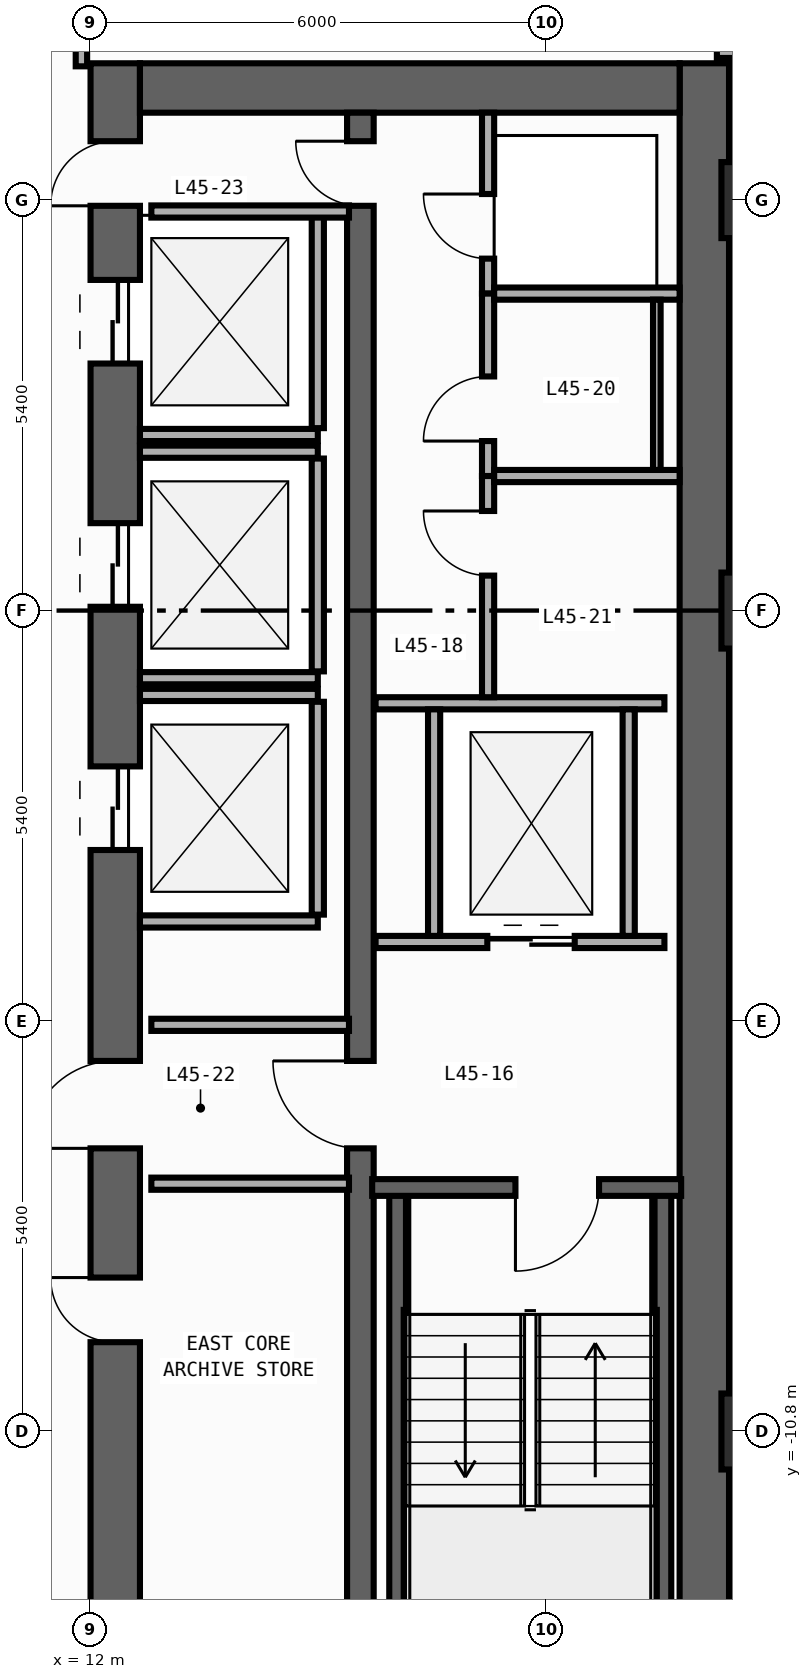
"""IFC4 building model, lengths in metres.
Left out: names, types, materials, properties, quantities, classifications, styles, units other than length and angle.
Written with IfcOpenShell. Run it as: python <this file> out.ifc"""

import sys

from ifc_helpers import new_model, si_unit, direction, frame, frame_2d, origin, origin_2d, place, context, subcontext, project, spatial, rectangle, extrude, element, fill, save


model = new_model("IFC4")
c1 = context("Model", 3, precision=1e-05, world=origin(), true_north=direction((0.0, 1.0)))
c2 = subcontext(c1, "Body", "Model", "MODEL_VIEW")
j1 = project(units=[si_unit("LENGTHUNIT", "METRE"), si_unit("PLANEANGLEUNIT", "RADIAN")], contexts=[c1])
p1 = place(None, origin())
s1 = spatial("IfcSite", under=j1, at=p1, CompositionType="ELEMENT")
p2 = place(p1, origin())
s2 = spatial("IfcBuilding", under=s1, at=p2, CompositionType="ELEMENT")
p3 = place(p2, frame((0.0, 0.0, 195.4)))
s3 = spatial("IfcBuildingStorey", under=s2, at=p3, CompositionType="ELEMENT", Elevation=195.4)
p4 = place(p3, frame((12.325, -19.8, 0.0), z_axis=(0.0, 0.0, 1.0), x_axis=(0.0, 1.0, 0.0)))
e1 = element("IfcWall", 1, at=p4, inside=s3, PredefinedType="SHEAR", context=c2, shape_type="SweptSolid", body=[
    extrude(rectangle(XDim=27.0, YDim=0.65, at=frame_2d((13.5, 0.0))), origin(), (0.0, 0.0, 1.0), 3.54),
])
p5 = place(p4, frame((23.05, 0.0, 0.0)))
e2 = element("IfcOpeningElement", 2, at=p5, cuts=e1, PredefinedType="OPENING", context=c2, shape_type="SweptSolid", body=[
    extrude(rectangle(XDim=1.1, YDim=2.2, at=frame_2d((0.55, 1.1))), frame((0.0, 0.335, 0.0), z_axis=(0.0, -1.0, 0.0), x_axis=(1.0, 0.0, 0.0)), (0.0, 0.0, 1.0), 0.67),
])
p6 = place(p4, frame((19.85, 0.0, 0.0)))
e3 = element("IfcOpeningElement", 3, at=p6, cuts=e1, PredefinedType="OPENING", context=c2, shape_type="SweptSolid", body=[
    extrude(rectangle(XDim=1.1, YDim=2.2, at=frame_2d((0.55, 1.1))), frame((0.0, 0.335, 0.0), z_axis=(0.0, -1.0, 0.0), x_axis=(1.0, 0.0, 0.0)), (0.0, 0.0, 1.0), 0.67),
])
p7 = place(p4, frame((16.65, 0.0, 0.0)))
e4 = element("IfcOpeningElement", 4, at=p7, cuts=e1, PredefinedType="OPENING", context=c2, shape_type="SweptSolid", body=[
    extrude(rectangle(XDim=1.1, YDim=2.2, at=frame_2d((0.55, 1.1))), frame((0.0, 0.335, 0.0), z_axis=(0.0, -1.0, 0.0), x_axis=(1.0, 0.0, 0.0)), (0.0, 0.0, 1.0), 0.67),
])
p8 = place(p4, frame((10.175, 0.0, 0.0)))
e5 = element("IfcOpeningElement", 5, at=p8, cuts=e1, PredefinedType="OPENING", context=c2, shape_type="SweptSolid", body=[
    extrude(rectangle(XDim=0.85, YDim=2.1, at=frame_2d((0.425, 1.05))), frame((0.0, 0.335, 0.0), z_axis=(0.0, -1.0, 0.0), x_axis=(1.0, 0.0, 0.0)), (0.0, 0.0, 1.0), 0.67),
])
p9 = place(p4, frame((12.725, 0.0, 0.0)))
e6 = element("IfcOpeningElement", 6, at=p9, cuts=e1, PredefinedType="OPENING", context=c2, shape_type="SweptSolid", body=[
    extrude(rectangle(XDim=1.15, YDim=2.2, at=frame_2d((0.575, 1.1))), frame((0.0, 0.335, 0.0), z_axis=(0.0, -1.0, 0.0), x_axis=(1.0, 0.0, 0.0)), (0.0, 0.0, 1.0), 0.67),
])
p10 = place(p4, frame((25.125, 0.0, 0.0)))
e7 = element("IfcOpeningElement", 7, at=p10, cuts=e1, PredefinedType="OPENING", context=c2, shape_type="SweptSolid", body=[
    extrude(rectangle(XDim=0.85, YDim=2.1, at=frame_2d((0.425, 1.05))), frame((0.0, 0.335, 0.0), z_axis=(0.0, -1.0, 0.0), x_axis=(1.0, 0.0, 0.0)), (0.0, 0.0, 1.0), 0.67),
])
p11 = place(p3, frame((20.075, -19.8, 0.0), z_axis=(0.0, 0.0, 1.0), x_axis=(0.0, 1.0, 0.0)))
e8 = element("IfcWall", 8, at=p11, inside=s3, PredefinedType="SHEAR", context=c2, shape_type="SweptSolid", body=[
    extrude(rectangle(XDim=27.0, YDim=0.65, at=frame_2d((13.5, 0.0))), origin(), (0.0, 0.0, 1.0), 3.54),
])
p12 = place(p3, frame((12.65, 6.875, 0.0), z_axis=(0.0, 0.0, 1.0), x_axis=(1.0, 0.0, 0.0)))
e9 = element("IfcWall", 9, at=p12, inside=s3, PredefinedType="SHEAR", context=c2, shape_type="SweptSolid", body=[
    extrude(rectangle(XDim=7.1, YDim=0.65, at=frame_2d((3.55, 0.0))), origin(), (0.0, 0.0, 1.0), 3.54),
])
p13 = place(p3, frame((15.55, -19.15, 0.0), z_axis=(0.0, 0.0, 1.0), x_axis=(0.0, 1.0, 0.0)))
e10 = element("IfcWall", 10, at=p13, inside=s3, PredefinedType="SHEAR", context=c2, shape_type="SweptSolid", body=[
    extrude(rectangle(XDim=25.7, YDim=0.35, at=frame_2d((12.85, 0.0))), origin(), (0.0, 0.0, 1.0), 3.54),
])
p14 = place(p13, frame((12.075, 0.0, 0.0)))
e11 = element("IfcOpeningElement", 11, at=p14, cuts=e10, PredefinedType="OPENING", context=c2, shape_type="SweptSolid", body=[
    extrude(rectangle(XDim=1.15, YDim=2.2, at=frame_2d((0.575, 1.1))), frame((0.0, 0.185, 0.0), z_axis=(0.0, -1.0, 0.0), x_axis=(1.0, 0.0, 0.0)), (0.0, 0.0, 1.0), 0.37),
])
p15 = place(p13, frame((24.475, 0.0, 0.0)))
e12 = element("IfcOpeningElement", 12, at=p15, cuts=e10, PredefinedType="OPENING", context=c2, shape_type="SweptSolid", body=[
    extrude(rectangle(XDim=0.85, YDim=2.1, at=frame_2d((0.425, 1.05))), frame((0.0, 0.185, 0.0), z_axis=(0.0, -1.0, 0.0), x_axis=(1.0, 0.0, 0.0)), (0.0, 0.0, 1.0), 0.37),
])
for number, where, z_axis, x_axis in (
    (13, (16.04, -19.01, 0.0), (0.0, 0.0, 1.0), (0.0, 1.0, 0.0)),
    (14, (19.53, -19.01, 0.0), (0.0, 0.0, 1.0), (0.0, 1.0, 0.0)),
):
    element("IfcWall", number, at=place(p3, frame(where, z_axis=z_axis, x_axis=x_axis)), inside=s3, PredefinedType="SHEAR", context=c2, shape_type="SweptSolid", body=[
        extrude(rectangle(XDim=11.42, YDim=0.22, at=frame_2d((5.71, 0.0))), origin(), (0.0, 0.0, 1.0), 3.54),
    ])
p16 = place(p3, frame((19.77, -7.59, 0.0), z_axis=(0.0, 0.0, 1.0), x_axis=(-1.0, 0.0, 0.0)))
e15 = element("IfcWall", 15, at=p16, inside=s3, PredefinedType="SHEAR", context=c2, shape_type="SweptSolid", body=[
    extrude(rectangle(XDim=4.065, YDim=0.22, at=frame_2d((2.032, 0.0))), origin(), (0.0, 0.0, 1.0), 3.54),
])
p17 = place(p16, frame((1.08, 0.0, 0.0)))
e16 = element("IfcOpeningElement", 16, at=p17, cuts=e15, PredefinedType="OPENING", context=c2, shape_type="SweptSolid", body=[
    extrude(rectangle(XDim=1.1, YDim=2.2, at=frame_2d((0.55, 1.1))), frame((0.0, 0.12, 0.0), z_axis=(0.0, -1.0, 0.0), x_axis=(1.0, 0.0, 0.0)), (0.0, 0.0, 1.0), 0.24),
])
for number, where, z_axis, x_axis in (
    (17, (20.8, -10.8, 0.0), (0.0, 0.0, 1.0), (1.0, 0.0, 0.0)),
    (18, (20.8, 0.0, 0.0), (0.0, 0.0, 1.0), (1.0, 0.0, 0.0)),
    (19, (20.8, 5.4, 0.0), (0.0, 0.0, 1.0), (1.0, 0.0, 0.0)),
):
    element("IfcColumn", number, at=place(p3, frame(where, z_axis=z_axis, x_axis=x_axis)), inside=s3, PredefinedType="COLUMN", context=c2, shape_type="SweptSolid", body=[
        extrude(rectangle(XDim=1.0, YDim=1.0, at=origin_2d()), origin(), (0.0, 0.0, 1.0), 3.8),
    ])
p18 = place(p3, frame((12.65, 2.31, 0.0), z_axis=(0.0, 0.0, 1.0), x_axis=(1.0, 0.0, 0.0)))
e20 = element("IfcWall", 20, at=p18, inside=s3, PredefinedType="STANDARD", context=c2, shape_type="SweptSolid", body=[
    extrude(rectangle(XDim=2.34, YDim=0.16, at=frame_2d((1.17, 0.0))), origin(), (0.0, 0.0, 1.0), 3.54),
])
p19 = place(p3, frame((14.99, 2.4, 0.0), z_axis=(0.0, 0.0, 1.0), x_axis=(0.0, 1.0, 0.0)))
e21 = element("IfcWall", 21, at=p19, inside=s3, PredefinedType="STANDARD", context=c2, shape_type="SweptSolid", body=[
    extrude(rectangle(XDim=2.8, YDim=0.16, at=frame_2d((1.4, 0.0))), origin(), (0.0, 0.0, 1.0), 3.54),
])
for number, where, z_axis, x_axis in (
    (22, (12.65, -0.89, 0.0), (0.0, 0.0, 1.0), (1.0, 0.0, 0.0)),
    (23, (12.65, 2.09, 0.0), (0.0, 0.0, 1.0), (1.0, 0.0, 0.0)),
):
    element("IfcWall", number, at=place(p3, frame(where, z_axis=z_axis, x_axis=x_axis)), inside=s3, PredefinedType="STANDARD", context=c2, shape_type="SweptSolid", body=[
        extrude(rectangle(XDim=2.34, YDim=0.16, at=frame_2d((1.17, 0.0))), origin(), (0.0, 0.0, 1.0), 3.54),
    ])
p20 = place(p3, frame((14.99, -0.8, 0.0), z_axis=(0.0, 0.0, 1.0), x_axis=(0.0, 1.0, 0.0)))
e24 = element("IfcWall", 24, at=p20, inside=s3, PredefinedType="STANDARD", context=c2, shape_type="SweptSolid", body=[
    extrude(rectangle(XDim=2.8, YDim=0.16, at=frame_2d((1.4, 0.0))), origin(), (0.0, 0.0, 1.0), 3.54),
])
for number, where, z_axis, x_axis in (
    (25, (12.65, -4.09, 0.0), (0.0, 0.0, 1.0), (1.0, 0.0, 0.0)),
    (26, (12.65, -1.11, 0.0), (0.0, 0.0, 1.0), (1.0, 0.0, 0.0)),
):
    element("IfcWall", number, at=place(p3, frame(where, z_axis=z_axis, x_axis=x_axis)), inside=s3, PredefinedType="STANDARD", context=c2, shape_type="SweptSolid", body=[
        extrude(rectangle(XDim=2.34, YDim=0.16, at=frame_2d((1.17, 0.0))), origin(), (0.0, 0.0, 1.0), 3.54),
    ])
p21 = place(p3, frame((14.99, -4.0, 0.0), z_axis=(0.0, 0.0, 1.0), x_axis=(0.0, 1.0, 0.0)))
e27 = element("IfcWall", 27, at=p21, inside=s3, PredefinedType="STANDARD", context=c2, shape_type="SweptSolid", body=[
    extrude(rectangle(XDim=2.8, YDim=0.16, at=frame_2d((1.4, 0.0))), origin(), (0.0, 0.0, 1.0), 3.54),
])
p22 = place(p3, frame((15.75, -4.36, 0.0), z_axis=(0.0, 0.0, 1.0), x_axis=(1.0, 0.0, 0.0)))
e28 = element("IfcWall", 28, at=p22, inside=s3, PredefinedType="STANDARD", context=c2, shape_type="SweptSolid", body=[
    extrude(rectangle(XDim=3.8, YDim=0.16, at=frame_2d((1.9, 0.0))), origin(), (0.0, 0.0, 1.0), 3.54),
])
p23 = place(p22, frame((1.47, 0.0, 0.0)))
e29 = element("IfcOpeningElement", 29, at=p23, cuts=e28, PredefinedType="OPENING", context=c2, shape_type="SweptSolid", body=[
    extrude(rectangle(XDim=1.15, YDim=2.2, at=frame_2d((0.575, 1.1))), frame((0.0, 0.09, 0.0), z_axis=(0.0, -1.0, 0.0), x_axis=(1.0, 0.0, 0.0)), (0.0, 0.0, 1.0), 0.18),
])
p24 = place(p3, frame((15.75, -1.22, 0.0), z_axis=(0.0, 0.0, 1.0), x_axis=(1.0, 0.0, 0.0)))
e30 = element("IfcWall", 30, at=p24, inside=s3, PredefinedType="STANDARD", context=c2, shape_type="SweptSolid", body=[
    extrude(rectangle(XDim=3.8, YDim=0.16, at=frame_2d((1.9, 0.0))), origin(), (0.0, 0.0, 1.0), 3.54),
])
for number, where, z_axis, x_axis in (
    (31, (16.52, -4.28, 0.0), (0.0, 0.0, 1.0), (0.0, 1.0, 0.0)),
    (32, (19.08, -4.28, 0.0), (0.0, 0.0, 1.0), (0.0, 1.0, 0.0)),
):
    element("IfcWall", number, at=place(p3, frame(where, z_axis=z_axis, x_axis=x_axis)), inside=s3, PredefinedType="STANDARD", context=c2, shape_type="SweptSolid", body=[
        extrude(rectangle(XDim=2.98, YDim=0.16, at=frame_2d((1.49, 0.0))), origin(), (0.0, 0.0, 1.0), 3.54),
    ])
for number, where, z_axis, x_axis in (
    (33, (12.8, -5.45, 0.0), (0.0, 0.0, 1.0), (1.0, 0.0, 0.0)),
    (34, (12.8, -7.54, 0.0), (0.0, 0.0, 1.0), (1.0, 0.0, 0.0)),
    (35, (12.8, 5.25, 0.0), (0.0, 0.0, 1.0), (1.0, 0.0, 0.0)),
):
    element("IfcWall", number, at=place(p3, frame(where, z_axis=z_axis, x_axis=x_axis)), inside=s3, PredefinedType="STANDARD", context=c2, shape_type="SweptSolid", body=[
        extrude(rectangle(XDim=2.6, YDim=0.16, at=frame_2d((1.3, 0.0))), origin(), (0.0, 0.0, 1.0), 3.54),
    ])
p25 = place(p3, frame((17.23, 4.17, 0.0), z_axis=(0.0, 0.0, 1.0), x_axis=(0.0, 1.0, 0.0)))
e36 = element("IfcWall", 36, at=p25, inside=s3, PredefinedType="PARTITIONING", context=c2, shape_type="SweptSolid", body=[
    extrude(rectangle(XDim=2.38, YDim=0.16, at=frame_2d((1.19, 0.0))), origin(), (0.0, 0.0, 1.0), 3.54),
])
p26 = place(p25, frame((0.46, 0.0, 0.0)))
e37 = element("IfcOpeningElement", 37, at=p26, cuts=e36, PredefinedType="OPENING", context=c2, shape_type="SweptSolid", body=[
    extrude(rectangle(XDim=0.85, YDim=2.1, at=frame_2d((0.425, 1.05))), frame((0.0, 0.09, 0.0), z_axis=(0.0, -1.0, 0.0), x_axis=(1.0, 0.0, 0.0)), (0.0, 0.0, 1.0), 0.18),
])
p27 = place(p3, frame((17.23, 1.77, 0.0), z_axis=(0.0, 0.0, 1.0), x_axis=(0.0, 1.0, 0.0)))
e38 = element("IfcWall", 38, at=p27, inside=s3, PredefinedType="PARTITIONING", context=c2, shape_type="SweptSolid", body=[
    extrude(rectangle(XDim=2.4, YDim=0.16, at=frame_2d((1.2, 0.0))), origin(), (0.0, 0.0, 1.0), 3.54),
])
p28 = place(p27, frame((0.46, 0.0, 0.0)))
e39 = element("IfcOpeningElement", 39, at=p28, cuts=e38, PredefinedType="OPENING", context=c2, shape_type="SweptSolid", body=[
    extrude(rectangle(XDim=0.85, YDim=2.1, at=frame_2d((0.425, 1.05))), frame((0.0, 0.09, 0.0), z_axis=(0.0, -1.0, 0.0), x_axis=(1.0, 0.0, 0.0)), (0.0, 0.0, 1.0), 0.18),
])
p29 = place(p3, frame((17.23, -1.14, 0.0), z_axis=(0.0, 0.0, 1.0), x_axis=(0.0, 1.0, 0.0)))
e40 = element("IfcWall", 40, at=p29, inside=s3, PredefinedType="PARTITIONING", context=c2, shape_type="SweptSolid", body=[
    extrude(rectangle(XDim=2.91, YDim=0.16, at=frame_2d((1.455, 0.0))), origin(), (0.0, 0.0, 1.0), 3.54),
])
p30 = place(p29, frame((1.6, 0.0, 0.0)))
e41 = element("IfcOpeningElement", 41, at=p30, cuts=e40, PredefinedType="OPENING", context=c2, shape_type="SweptSolid", body=[
    extrude(rectangle(XDim=0.85, YDim=2.1, at=frame_2d((0.425, 1.05))), frame((0.0, 0.09, 0.0), z_axis=(0.0, -1.0, 0.0), x_axis=(1.0, 0.0, 0.0)), (0.0, 0.0, 1.0), 0.18),
])
for number, where, z_axis, x_axis in (
    (42, (17.31, 4.17, 0.0), (0.0, 0.0, 1.0), (1.0, 0.0, 0.0)),
    (43, (17.31, 1.77, 0.0), (0.0, 0.0, 1.0), (1.0, 0.0, 0.0)),
):
    element("IfcWall", number, at=place(p3, frame(where, z_axis=z_axis, x_axis=x_axis)), inside=s3, PredefinedType="PARTITIONING", context=c2, shape_type="SweptSolid", body=[
        extrude(rectangle(XDim=2.44, YDim=0.16, at=frame_2d((1.22, 0.0))), origin(), (0.0, 0.0, 1.0), 3.54),
    ])
p31 = place(p3, frame((11.88, 7.16, 0.0), z_axis=(0.0, 0.0, 1.0), x_axis=(0.0, 1.0, 0.0)))
e44 = element("IfcWall", 44, at=p31, inside=s3, PredefinedType="PARTITIONING", context=c2, shape_type="SweptSolid", body=[
    extrude(rectangle(XDim=8.455, YDim=0.15, at=frame_2d((4.228, 0.0))), origin(), (0.0, 0.0, 1.0), 3.54),
])
p32 = place(p31, frame((0.46, 0.0, 0.0)))
e45 = element("IfcOpeningElement", 45, at=p32, cuts=e44, PredefinedType="OPENING", context=c2, shape_type="SweptSolid", body=[
    extrude(rectangle(XDim=0.9, YDim=2.15, at=frame_2d((0.45, 1.075))), frame((0.0, 0.085, 0.0), z_axis=(0.0, -1.0, 0.0), x_axis=(1.0, 0.0, 0.0)), (0.0, 0.0, 1.0), 0.17),
])
p33 = place(p3, frame((20.24, 7.34, 0.0), z_axis=(0.0, 0.0, 1.0), x_axis=(1.0, 0.0, 0.0)))
e46 = element("IfcWall", 46, at=p33, inside=s3, PredefinedType="PARTITIONING", context=c2, shape_type="SweptSolid", body=[
    extrude(rectangle(XDim=2.215, YDim=0.14, at=frame_2d((1.107, 0.0))), origin(), (0.0, 0.0, 1.0), 3.54),
])
p34 = place(p33, frame((0.905, 0.0, 0.0)))
e47 = element("IfcOpeningElement", 47, at=p34, cuts=e46, PredefinedType="OPENING", context=c2, shape_type="SweptSolid", body=[
    extrude(rectangle(XDim=0.85, YDim=2.1, at=frame_2d((0.425, 1.05))), frame((0.0, 0.08, 0.0), z_axis=(0.0, -1.0, 0.0), x_axis=(1.0, 0.0, 0.0)), (0.0, 0.0, 1.0), 0.16),
])
p35 = place(p3, frame((19.45, 4.09, 0.0), z_axis=(0.0, 0.0, 1.0), x_axis=(0.0, -1.0, 0.0)))
e48 = element("IfcWall", 48, at=p35, inside=s3, PredefinedType="PARTITIONING", context=c2, shape_type="SweptSolid", body=[
    extrude(rectangle(XDim=2.24, YDim=0.1, at=frame_2d((1.12, 0.0))), origin(), (0.0, 0.0, 1.0), 3.54),
])
p36 = place(p17, origin())
e49 = element("IfcDoor", 49, at=p36, inside=s3, OperationType="SINGLE_SWING_RIGHT", PredefinedType="DOOR", context=c2, shape_type="SweptSolid", body=[
    extrude(rectangle(XDim=1.1, YDim=2.2, at=frame_2d((0.55, 1.1))), frame((0.0, 0.025, 0.0), z_axis=(0.0, -1.0, 0.0), x_axis=(1.0, 0.0, 0.0)), (0.0, 0.0, 1.0), 0.05),
])
fill(e16, e49)
p37 = place(p5, origin())
e50 = element("IfcDoor", 50, at=p37, inside=s3, OperationType="DOUBLE_DOOR_SLIDING", PredefinedType="DOOR", context=c2, shape_type="SweptSolid", body=[
    extrude(rectangle(XDim=1.1, YDim=2.2, at=frame_2d((0.55, 1.1))), frame((0.0, 0.025, 0.0), z_axis=(0.0, -1.0, 0.0), x_axis=(1.0, 0.0, 0.0)), (0.0, 0.0, 1.0), 0.05),
])
fill(e2, e50)
p38 = place(p6, origin())
e51 = element("IfcDoor", 51, at=p38, inside=s3, OperationType="DOUBLE_DOOR_SLIDING", PredefinedType="DOOR", context=c2, shape_type="SweptSolid", body=[
    extrude(rectangle(XDim=1.1, YDim=2.2, at=frame_2d((0.55, 1.1))), frame((0.0, 0.025, 0.0), z_axis=(0.0, -1.0, 0.0), x_axis=(1.0, 0.0, 0.0)), (0.0, 0.0, 1.0), 0.05),
])
fill(e3, e51)
p39 = place(p7, origin())
e52 = element("IfcDoor", 52, at=p39, inside=s3, OperationType="DOUBLE_DOOR_SLIDING", PredefinedType="DOOR", context=c2, shape_type="SweptSolid", body=[
    extrude(rectangle(XDim=1.1, YDim=2.2, at=frame_2d((0.55, 1.1))), frame((0.0, 0.025, 0.0), z_axis=(0.0, -1.0, 0.0), x_axis=(1.0, 0.0, 0.0)), (0.0, 0.0, 1.0), 0.05),
])
fill(e4, e52)
p40 = place(p8, origin())
e53 = element("IfcDoor", 53, at=p40, inside=s3, OperationType="SINGLE_SWING_RIGHT", PredefinedType="DOOR", context=c2, shape_type="SweptSolid", body=[
    extrude(rectangle(XDim=0.85, YDim=2.1, at=frame_2d((0.425, 1.05))), frame((0.0, 0.025, 0.0), z_axis=(0.0, -1.0, 0.0), x_axis=(1.0, 0.0, 0.0)), (0.0, 0.0, 1.0), 0.05),
])
fill(e5, e53)
p41 = place(p9, origin())
e54 = element("IfcDoor", 54, at=p41, inside=s3, OperationType="SINGLE_SWING_LEFT", PredefinedType="DOOR", context=c2, shape_type="SweptSolid", body=[
    extrude(rectangle(XDim=1.15, YDim=2.2, at=frame_2d((0.575, 1.1))), frame((0.0, 0.025, 0.0), z_axis=(0.0, -1.0, 0.0), x_axis=(1.0, 0.0, 0.0)), (0.0, 0.0, 1.0), 0.05),
])
fill(e6, e54)
p42 = place(p14, origin())
e55 = element("IfcDoor", 55, at=p42, inside=s3, OperationType="SINGLE_SWING_RIGHT", PredefinedType="DOOR", context=c2, shape_type="SweptSolid", body=[
    extrude(rectangle(XDim=1.15, YDim=2.2, at=frame_2d((0.575, 1.1))), frame((0.0, 0.025, 0.0), z_axis=(0.0, -1.0, 0.0), x_axis=(1.0, 0.0, 0.0)), (0.0, 0.0, 1.0), 0.05),
])
fill(e11, e55)
p43 = place(p10, origin())
e56 = element("IfcDoor", 56, at=p43, inside=s3, OperationType="SINGLE_SWING_LEFT", PredefinedType="DOOR", context=c2, shape_type="SweptSolid", body=[
    extrude(rectangle(XDim=0.85, YDim=2.1, at=frame_2d((0.425, 1.05))), frame((0.0, 0.025, 0.0), z_axis=(0.0, -1.0, 0.0), x_axis=(1.0, 0.0, 0.0)), (0.0, 0.0, 1.0), 0.05),
])
fill(e7, e56)
p44 = place(p15, origin())
e57 = element("IfcDoor", 57, at=p44, inside=s3, OperationType="SINGLE_SWING_RIGHT", PredefinedType="DOOR", context=c2, shape_type="SweptSolid", body=[
    extrude(rectangle(XDim=0.85, YDim=2.1, at=frame_2d((0.425, 1.05))), frame((0.0, 0.025, 0.0), z_axis=(0.0, -1.0, 0.0), x_axis=(1.0, 0.0, 0.0)), (0.0, 0.0, 1.0), 0.05),
])
fill(e12, e57)
p45 = place(p23, origin())
e58 = element("IfcDoor", 58, at=p45, inside=s3, OperationType="DOUBLE_DOOR_SLIDING", PredefinedType="DOOR", context=c2, shape_type="SweptSolid", body=[
    extrude(rectangle(XDim=1.15, YDim=2.2, at=frame_2d((0.575, 1.1))), frame((0.0, 0.025, 0.0), z_axis=(0.0, -1.0, 0.0), x_axis=(1.0, 0.0, 0.0)), (0.0, 0.0, 1.0), 0.05),
])
fill(e29, e58)
p46 = place(p26, origin())
e59 = element("IfcDoor", 59, at=p46, inside=s3, OperationType="SINGLE_SWING_RIGHT", PredefinedType="DOOR", context=c2, shape_type="SweptSolid", body=[
    extrude(rectangle(XDim=0.85, YDim=2.1, at=frame_2d((0.425, 1.05))), frame((0.0, 0.025, 0.0), z_axis=(0.0, -1.0, 0.0), x_axis=(1.0, 0.0, 0.0)), (0.0, 0.0, 1.0), 0.05),
])
fill(e37, e59)
p47 = place(p28, origin())
e60 = element("IfcDoor", 60, at=p47, inside=s3, OperationType="SINGLE_SWING_LEFT", PredefinedType="DOOR", context=c2, shape_type="SweptSolid", body=[
    extrude(rectangle(XDim=0.85, YDim=2.1, at=frame_2d((0.425, 1.05))), frame((0.0, 0.025, 0.0), z_axis=(0.0, -1.0, 0.0), x_axis=(1.0, 0.0, 0.0)), (0.0, 0.0, 1.0), 0.05),
])
fill(e39, e60)
p48 = place(p30, origin())
e61 = element("IfcDoor", 61, at=p48, inside=s3, OperationType="SINGLE_SWING_RIGHT", PredefinedType="DOOR", context=c2, shape_type="SweptSolid", body=[
    extrude(rectangle(XDim=0.85, YDim=2.1, at=frame_2d((0.425, 1.05))), frame((0.0, 0.025, 0.0), z_axis=(0.0, -1.0, 0.0), x_axis=(1.0, 0.0, 0.0)), (0.0, 0.0, 1.0), 0.05),
])
fill(e41, e61)
save(model, sys.argv[1])
